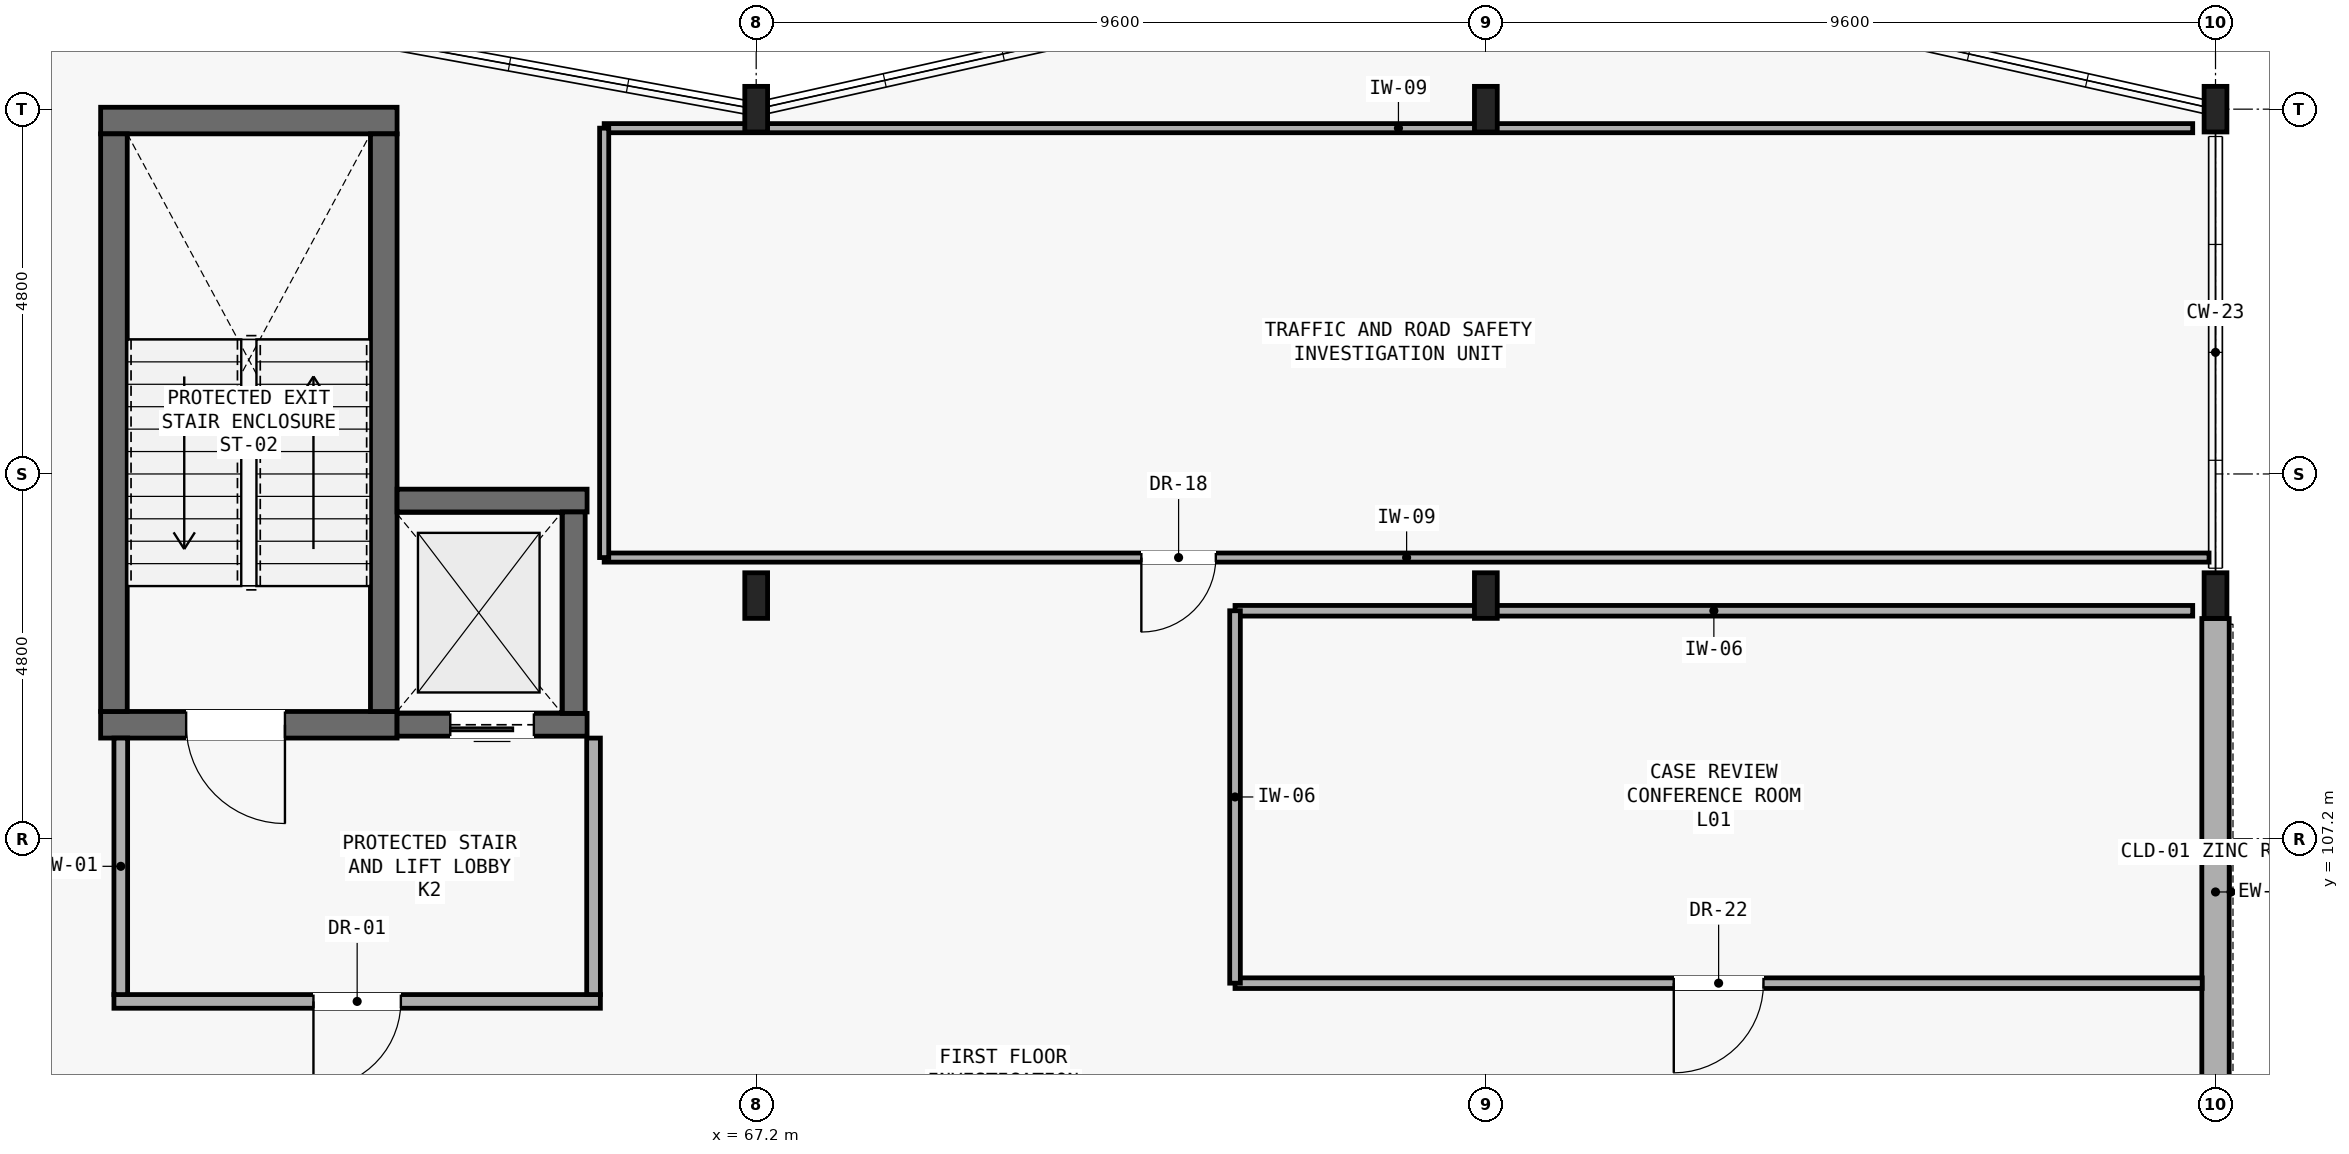
"""IFC4 building model, lengths in metres.
Left out: names, types, materials, properties, quantities, classifications, styles, units other than length and angle.
Written with IfcOpenShell. Run it as: python <this file> out.ifc"""

import sys

from ifc_helpers import new_model, si_unit, direction, frame, frame_2d, origin, origin_2d, place, context, subcontext, project, spatial, rectangle, i_section, extrude, element, fill, save


model = new_model("IFC4")
c1 = context("Model", 3, precision=1e-05, world=origin(), true_north=direction((0.0, 1.0)))
c2 = subcontext(c1, "Body", "Model", "MODEL_VIEW")
j1 = project(units=[si_unit("LENGTHUNIT", "METRE"), si_unit("PLANEANGLEUNIT", "RADIAN")], contexts=[c1])
p1 = place(None, origin())
s1 = spatial("IfcSite", under=j1, at=p1, CompositionType="ELEMENT")
p2 = place(p1, origin())
s2 = spatial("IfcBuilding", under=s1, at=p2, CompositionType="ELEMENT")
p3 = place(p2, frame((0.0, 0.0, 5.25)))
s3 = spatial("IfcBuildingStorey", under=s2, at=p3, CompositionType="ELEMENT", Elevation=5.25)
for number, where, z_axis, x_axis in (
    (1, (67.2, 110.4, 0.0), (0.0, 0.0, 1.0), (1.0, 0.0, 0.0)),
    (2, (67.2, 116.8, 0.0), (0.0, 0.0, 1.0), (1.0, 0.0, 0.0)),
    (3, (76.8, 110.4, 0.0), (0.0, 0.0, 1.0), (1.0, 0.0, 0.0)),
    (4, (76.8, 116.8, 0.0), (0.0, 0.0, 1.0), (1.0, 0.0, 0.0)),
    (5, (86.4, 110.4, 0.0), (0.0, 0.0, 1.0), (1.0, 0.0, 0.0)),
    (6, (86.4, 116.8, 0.0), (0.0, 0.0, 1.0), (1.0, 0.0, 0.0)),
):
    element("IfcColumn", number, at=place(p3, frame(where, z_axis=z_axis, x_axis=x_axis)), inside=s3, PredefinedType="COLUMN", context=c2, shape_type="SweptSolid", body=[
        extrude(i_section(OverallWidth=0.3, OverallDepth=0.6, WebThickness=0.015, FlangeThickness=0.03, FilletRadius=0.027, at=origin_2d()), origin(), (0.0, 0.0, 1.0), 4.2),
    ])
p4 = place(p3, frame((86.4, 102.902, 0.0), z_axis=(0.0, 0.0, 1.0), x_axis=(0.0, 1.0, 0.0)))
e7 = element("IfcWall", 7, at=p4, inside=s3, PredefinedType="SOLIDWALL", context=c2, shape_type="SweptSolid", body=[
    extrude(rectangle(XDim=7.196, YDim=0.36, at=frame_2d((3.598, 0.0))), origin(), (0.0, 0.0, 1.0), 3.5),
])
p5 = place(p3, frame((58.575, 108.7, 0.0), z_axis=(0.0, 0.0, 1.0), x_axis=(1.0, 0.0, 0.0)))
e8 = element("IfcWall", 8, at=p5, inside=s3, PredefinedType="SHEAR", context=c2, shape_type="SweptSolid", body=[
    extrude(rectangle(XDim=3.9, YDim=0.35, at=frame_2d((1.95, 0.0))), origin(), (0.0, 0.0, 1.0), 3.96),
])
p6 = place(p5, frame((1.125, 0.0, 0.0)))
e9 = element("IfcOpeningElement", 9, at=p6, cuts=e8, PredefinedType="OPENING", context=c2, shape_type="SweptSolid", body=[
    extrude(rectangle(XDim=1.3, YDim=2.15, at=frame_2d((0.65, 1.075))), frame((0.0, 0.185, 0.0), z_axis=(0.0, -1.0, 0.0), x_axis=(1.0, 0.0, 0.0)), (0.0, 0.0, 1.0), 0.37),
])
p7 = place(p3, frame((58.575, 116.65, 0.0), z_axis=(0.0, 0.0, 1.0), x_axis=(1.0, 0.0, 0.0)))
e10 = element("IfcWall", 10, at=p7, inside=s3, PredefinedType="SHEAR", context=c2, shape_type="SweptSolid", body=[
    extrude(rectangle(XDim=3.9, YDim=0.35, at=frame_2d((1.95, 0.0))), origin(), (0.0, 0.0, 1.0), 3.96),
])
for number, where, z_axis, x_axis in (
    (11, (58.75, 108.875, 0.0), (0.0, 0.0, 1.0), (0.0, 1.0, 0.0)),
    (12, (62.3, 108.875, 0.0), (0.0, 0.0, 1.0), (0.0, 1.0, 0.0)),
):
    element("IfcWall", number, at=place(p3, frame(where, z_axis=z_axis, x_axis=x_axis)), inside=s3, PredefinedType="SHEAR", context=c2, shape_type="SweptSolid", body=[
        extrude(rectangle(XDim=7.6, YDim=0.35, at=frame_2d((3.8, 0.0))), origin(), (0.0, 0.0, 1.0), 3.96),
    ])
p8 = place(p3, frame((62.475, 108.7, 0.0), z_axis=(0.0, 0.0, 1.0), x_axis=(1.0, 0.0, 0.0)))
e13 = element("IfcWall", 13, at=p8, inside=s3, PredefinedType="SHEAR", context=c2, shape_type="SweptSolid", body=[
    extrude(rectangle(XDim=2.5, YDim=0.3, at=frame_2d((1.25, 0.0))), origin(), (0.0, 0.0, 1.0), 3.96),
])
p9 = place(p8, frame((0.7, 0.0, 0.0)))
e14 = element("IfcOpeningElement", 14, at=p9, cuts=e13, PredefinedType="OPENING", context=c2, shape_type="SweptSolid", body=[
    extrude(rectangle(XDim=1.1, YDim=2.1, at=frame_2d((0.55, 1.05))), frame((0.0, 0.16, 0.0), z_axis=(0.0, -1.0, 0.0), x_axis=(1.0, 0.0, 0.0)), (0.0, 0.0, 1.0), 0.32),
])
p10 = place(p3, frame((62.475, 111.65, 0.0), z_axis=(0.0, 0.0, 1.0), x_axis=(1.0, 0.0, 0.0)))
e15 = element("IfcWall", 15, at=p10, inside=s3, PredefinedType="SHEAR", context=c2, shape_type="SweptSolid", body=[
    extrude(rectangle(XDim=2.5, YDim=0.3, at=frame_2d((1.25, 0.0))), origin(), (0.0, 0.0, 1.0), 3.96),
])
p11 = place(p3, frame((64.8, 108.85, 0.0), z_axis=(0.0, 0.0, 1.0), x_axis=(0.0, 1.0, 0.0)))
e16 = element("IfcWall", 16, at=p11, inside=s3, PredefinedType="SHEAR", context=c2, shape_type="SweptSolid", body=[
    extrude(rectangle(XDim=2.65, YDim=0.3, at=frame_2d((1.325, 0.0))), origin(), (0.0, 0.0, 1.0), 3.96),
])
p12 = place(p3, frame((58.75, 105.06, 0.0), z_axis=(0.0, 0.0, 1.0), x_axis=(1.0, 0.0, 0.0)))
e17 = element("IfcWall", 17, at=p12, inside=s3, PredefinedType="PARTITIONING", context=c2, shape_type="SweptSolid", body=[
    extrude(rectangle(XDim=6.4, YDim=0.18, at=frame_2d((3.2, 0.0))), origin(), (0.0, 0.0, 1.0), 3.58),
])
p13 = place(p12, frame((2.625, 0.0, 0.0)))
e18 = element("IfcOpeningElement", 18, at=p13, cuts=e17, PredefinedType="OPENING", context=c2, shape_type="SweptSolid", body=[
    extrude(rectangle(XDim=1.15, YDim=2.15, at=frame_2d((0.575, 1.075))), frame((0.0, 0.1, 0.0), z_axis=(0.0, -1.0, 0.0), x_axis=(1.0, 0.0, 0.0)), (0.0, 0.0, 1.0), 0.2),
])
for number, where, z_axis, x_axis in (
    (19, (58.84, 105.15, 0.0), (0.0, 0.0, 1.0), (0.0, 1.0, 0.0)),
    (20, (65.06, 105.15, 0.0), (0.0, 0.0, 1.0), (0.0, 1.0, 0.0)),
):
    element("IfcWall", number, at=place(p3, frame(where, z_axis=z_axis, x_axis=x_axis)), inside=s3, PredefinedType="PARTITIONING", context=c2, shape_type="SweptSolid", body=[
        extrude(rectangle(XDim=3.375, YDim=0.18, at=frame_2d((1.688, 0.0))), origin(), (0.0, 0.0, 1.0), 3.96),
    ])
p14 = place(p3, frame((65.2, 110.9, 0.0), z_axis=(0.0, 0.0, 1.0), x_axis=(1.0, 0.0, 0.0)))
e21 = element("IfcWall", 21, at=p14, inside=s3, PredefinedType="PARTITIONING", context=c2, shape_type="SweptSolid", body=[
    extrude(rectangle(XDim=21.115, YDim=0.12, at=frame_2d((10.558, 0.0))), origin(), (0.0, 0.0, 1.0), 3.96),
])
p15 = place(p14, frame((7.067, 0.0, 0.0)))
e22 = element("IfcOpeningElement", 22, at=p15, cuts=e21, PredefinedType="OPENING", context=c2, shape_type="SweptSolid", body=[
    extrude(rectangle(XDim=0.98, YDim=2.1, at=frame_2d((0.49, 1.05))), frame((0.0, 0.07, 0.0), z_axis=(0.0, -1.0, 0.0), x_axis=(1.0, 0.0, 0.0)), (0.0, 0.0, 1.0), 0.14),
])
p16 = place(p3, frame((86.1, 116.55, 0.0), z_axis=(0.0, 0.0, 1.0), x_axis=(-1.0, 0.0, 0.0)))
e23 = element("IfcWall", 23, at=p16, inside=s3, PredefinedType="PARTITIONING", context=c2, shape_type="SweptSolid", body=[
    extrude(rectangle(XDim=20.9, YDim=0.12, at=frame_2d((10.45, 0.0))), origin(), (0.0, 0.0, 1.0), 3.63),
])
p17 = place(p3, frame((65.2, 116.55, 0.0), z_axis=(0.0, 0.0, 1.0), x_axis=(0.0, -1.0, 0.0)))
e24 = element("IfcWall", 24, at=p17, inside=s3, PredefinedType="PARTITIONING", context=c2, shape_type="SweptSolid", body=[
    extrude(rectangle(XDim=5.65, YDim=0.12, at=frame_2d((2.825, 0.0))), origin(), (0.0, 0.0, 1.0), 3.96),
])
p18 = place(p3, frame((73.5, 105.3, 0.0), z_axis=(0.0, 0.0, 1.0), x_axis=(1.0, 0.0, 0.0)))
e25 = element("IfcWall", 25, at=p18, inside=s3, PredefinedType="PARTITIONING", context=c2, shape_type="SweptSolid", body=[
    extrude(rectangle(XDim=12.725, YDim=0.14, at=frame_2d((6.363, 0.0))), origin(), (0.0, 0.0, 1.0), 3.58),
])
p19 = place(p18, frame((5.772, 0.0, 0.0)))
e26 = element("IfcOpeningElement", 26, at=p19, cuts=e25, PredefinedType="OPENING", context=c2, shape_type="SweptSolid", body=[
    extrude(rectangle(XDim=1.18, YDim=2.1, at=frame_2d((0.59, 1.05))), frame((0.0, 0.08, 0.0), z_axis=(0.0, -1.0, 0.0), x_axis=(1.0, 0.0, 0.0)), (0.0, 0.0, 1.0), 0.16),
])
p20 = place(p3, frame((86.1, 110.2, 0.0), z_axis=(0.0, 0.0, 1.0), x_axis=(-1.0, 0.0, 0.0)))
e27 = element("IfcWall", 27, at=p20, inside=s3, PredefinedType="PARTITIONING", context=c2, shape_type="SweptSolid", body=[
    extrude(rectangle(XDim=12.6, YDim=0.14, at=frame_2d((6.3, 0.0))), origin(), (0.0, 0.0, 1.0), 3.4),
])
p21 = place(p3, frame((73.5, 110.2, 0.0), z_axis=(0.0, 0.0, 1.0), x_axis=(0.0, -1.0, 0.0)))
e28 = element("IfcWall", 28, at=p21, inside=s3, PredefinedType="PARTITIONING", context=c2, shape_type="SweptSolid", body=[
    extrude(rectangle(XDim=4.9, YDim=0.14, at=frame_2d((2.45, 0.0))), origin(), (0.0, 0.0, 1.0), 3.96),
])
p22 = place(p6, frame((1.3, 0.0, 0.0), z_axis=(0.0, 0.0, 1.0), x_axis=(-1.0, 0.0, 0.0)))
e29 = element("IfcDoor", 29, at=p22, inside=s3, OperationType="SINGLE_SWING_RIGHT", PredefinedType="DOOR", context=c2, shape_type="SweptSolid", body=[
    extrude(rectangle(XDim=1.3, YDim=2.15, at=frame_2d((0.65, 1.075))), frame((0.0, 0.025, 0.0), z_axis=(0.0, -1.0, 0.0), x_axis=(1.0, 0.0, 0.0)), (0.0, 0.0, 1.0), 0.05),
])
fill(e9, e29)
p23 = place(p9, frame((1.1, 0.0, 0.0), z_axis=(0.0, 0.0, 1.0), x_axis=(-1.0, 0.0, 0.0)))
e30 = element("IfcDoor", 30, at=p23, inside=s3, OperationType="SLIDING_TO_LEFT", PredefinedType="DOOR", context=c2, shape_type="SweptSolid", body=[
    extrude(rectangle(XDim=1.1, YDim=2.1, at=frame_2d((0.55, 1.05))), frame((0.0, 0.025, 0.0), z_axis=(0.0, -1.0, 0.0), x_axis=(1.0, 0.0, 0.0)), (0.0, 0.0, 1.0), 0.05),
])
fill(e14, e30)
p24 = place(p13, frame((1.15, 0.0, 0.0), z_axis=(0.0, 0.0, 1.0), x_axis=(-1.0, 0.0, 0.0)))
e31 = element("IfcDoor", 31, at=p24, inside=s3, OperationType="SINGLE_SWING_LEFT", PredefinedType="DOOR", context=c2, shape_type="SweptSolid", body=[
    extrude(rectangle(XDim=1.15, YDim=2.15, at=frame_2d((0.575, 1.075))), frame((0.0, 0.025, 0.0), z_axis=(0.0, -1.0, 0.0), x_axis=(1.0, 0.0, 0.0)), (0.0, 0.0, 1.0), 0.05),
])
fill(e18, e31)
p25 = place(p15, frame((0.98, 0.0, 0.0), z_axis=(0.0, 0.0, 1.0), x_axis=(-1.0, 0.0, 0.0)))
e32 = element("IfcDoor", 32, at=p25, inside=s3, OperationType="SINGLE_SWING_LEFT", PredefinedType="DOOR", context=c2, shape_type="SweptSolid", body=[
    extrude(rectangle(XDim=0.98, YDim=2.1, at=frame_2d((0.49, 1.05))), frame((0.0, 0.025, 0.0), z_axis=(0.0, -1.0, 0.0), x_axis=(1.0, 0.0, 0.0)), (0.0, 0.0, 1.0), 0.05),
])
fill(e22, e32)
p26 = place(p19, frame((1.18, 0.0, 0.0), z_axis=(0.0, 0.0, 1.0), x_axis=(-1.0, 0.0, 0.0)))
e33 = element("IfcDoor", 33, at=p26, inside=s3, OperationType="SINGLE_SWING_LEFT", PredefinedType="DOOR", context=c2, shape_type="SweptSolid", body=[
    extrude(rectangle(XDim=1.18, YDim=2.1, at=frame_2d((0.59, 1.05))), frame((0.0, 0.025, 0.0), z_axis=(0.0, -1.0, 0.0), x_axis=(1.0, 0.0, 0.0)), (0.0, 0.0, 1.0), 0.05),
])
fill(e26, e33)
save(model, sys.argv[1])
